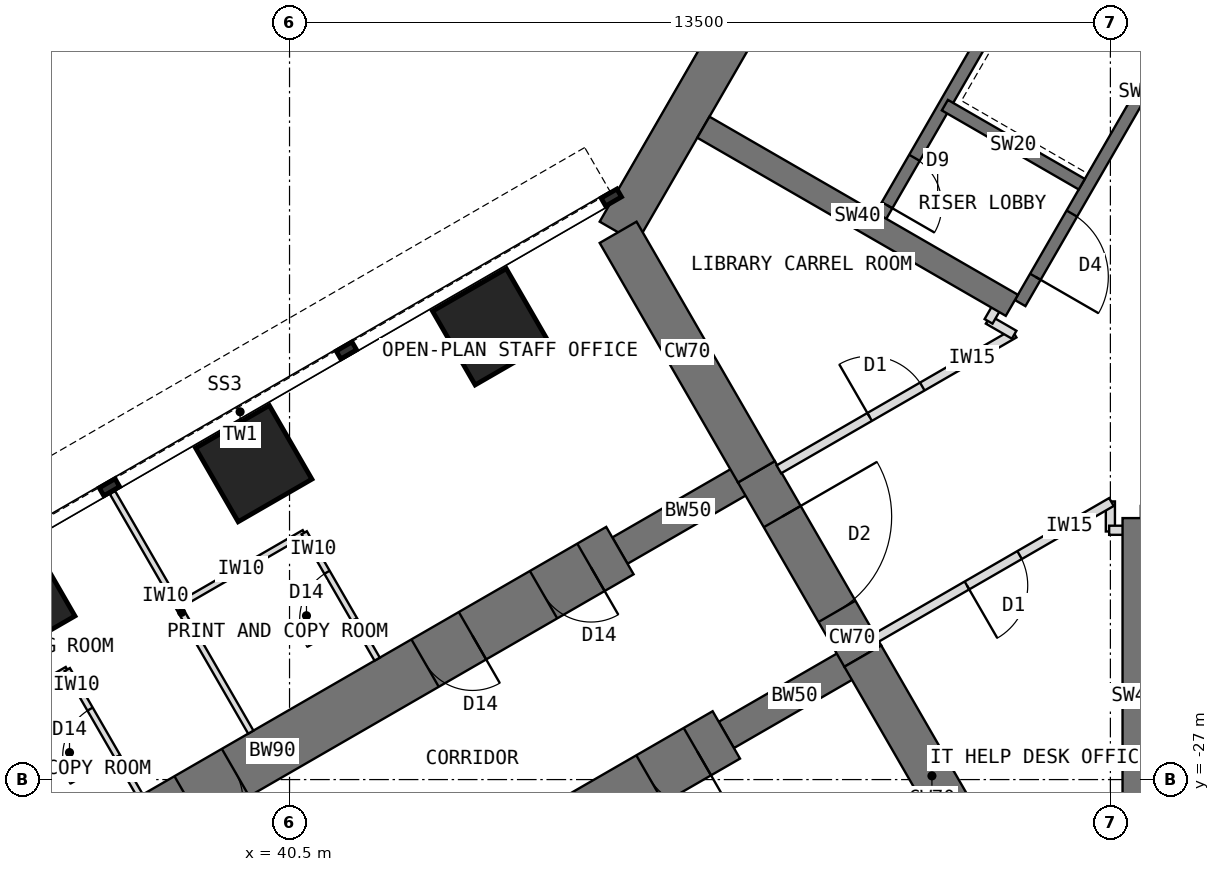
"""IFC4 building model, lengths in metres.
Left out: names, types, materials, properties, quantities, classifications, styles, units other than length and angle.
Written with IfcOpenShell. Run it as: python <this file> out.ifc"""

import sys

from ifc_helpers import new_model, si_unit, direction, frame, frame_2d, origin, origin_2d, place, context, subcontext, project, spatial, rectangle, extrude, element, fill, save


model = new_model("IFC4")
c1 = context("Model", 3, precision=1e-05, world=origin(), true_north=direction((0.0, 1.0)))
c2 = subcontext(c1, "Body", "Model", "MODEL_VIEW")
j1 = project(units=[si_unit("LENGTHUNIT", "METRE"), si_unit("PLANEANGLEUNIT", "RADIAN")], contexts=[c1])
p1 = place(None, origin())
s1 = spatial("IfcSite", under=j1, at=p1, CompositionType="ELEMENT")
p2 = place(p1, origin())
s2 = spatial("IfcBuilding", under=s1, at=p2, CompositionType="ELEMENT")
p3 = place(p2, frame((0.0, 0.0, 80.5)))
s3 = spatial("IfcBuildingStorey", under=s2, at=p3, CompositionType="ELEMENT", Elevation=80.5)
p4 = place(p3, frame((52.202, -7.092, 0.0), z_axis=(0.0, 0.0, 1.0), x_axis=(-0.500005998175, -0.866021940709, 0.0)))
e1 = element("IfcWall", 1, at=p4, inside=s3, PredefinedType="SHEAR", context=c2, shape_type="SweptSolid", body=[
    extrude(rectangle(XDim=12.596, YDim=0.7, at=frame_2d((6.298, 0.0))), origin(), (0.0, 0.0, 1.0), 4.0),
])
p5 = place(p3, frame((45.904, -18.0, 0.0), z_axis=(0.0, 0.0, 1.0), x_axis=(0.500024481964, -0.866011268655, 0.0)))
e2 = element("IfcWall", 2, at=p5, inside=s3, PredefinedType="SHEAR", context=c2, shape_type="SweptSolid", body=[
    extrude(rectangle(XDim=4.548, YDim=0.7, at=frame_2d((2.274, 0.0))), origin(), (0.0, 0.0, 1.0), 4.0),
])
p6 = place(p3, frame((48.178, -21.939, 0.0), z_axis=(0.0, 0.0, 1.0), x_axis=(0.500010275428, -0.866019471182, 0.0)))
e3 = element("IfcWall", 3, at=p6, inside=s3, PredefinedType="SHEAR", context=c2, shape_type="SweptSolid", body=[
    extrude(rectangle(XDim=3.5, YDim=0.7, at=frame_2d((1.75, 0.0))), origin(), (0.0, 0.0, 1.0), 4.0),
])
p7 = place(p6, frame((0.85, 0.0, 0.0)))
e4 = element("IfcOpeningElement", 4, at=p7, cuts=e3, PredefinedType="OPENING", context=c2, shape_type="SweptSolid", body=[
    extrude(rectangle(XDim=1.8, YDim=2.1, at=frame_2d((0.9, 1.05))), frame((0.0, 0.36, 0.0), z_axis=(0.0, -1.0, 0.0), x_axis=(1.0, 0.0, 0.0)), (0.0, 0.0, 1.0), 0.72),
])
p8 = place(p3, frame((49.928, -24.97, 0.0), z_axis=(0.0, 0.0, 1.0), x_axis=(0.499984222037, -0.866034513004, 0.0)))
e5 = element("IfcWall", 5, at=p8, inside=s3, PredefinedType="SHEAR", context=c2, shape_type="SweptSolid", body=[
    extrude(rectangle(XDim=4.548, YDim=0.7, at=frame_2d((2.274, 0.0))), origin(), (0.0, 0.0, 1.0), 4.0),
])
p9 = place(p3, frame((49.928, -24.97, 0.0), z_axis=(0.0, 0.0, 1.0), x_axis=(-0.866031863473, -0.499988811324, 0.0)))
e6 = element("IfcWall", 6, at=p9, inside=s3, PredefinedType="SHEAR", context=c2, shape_type="SweptSolid", body=[
    extrude(rectangle(XDim=2.592, YDim=0.5, at=frame_2d((1.296, 0.0))), origin(), (0.0, 0.0, 1.0), 4.0),
])
p10 = place(p3, frame((47.684, -26.266, 0.0), z_axis=(0.0, 0.0, 1.0), x_axis=(-0.866027579429, -0.499996231654, 0.0)))
e7 = element("IfcWall", 7, at=p10, inside=s3, PredefinedType="SHEAR", context=c2, shape_type="SweptSolid", body=[
    extrude(rectangle(XDim=13.2, YDim=0.9, at=frame_2d((6.6, 0.0))), origin(), (0.0, 0.0, 1.0), 4.0),
])
p11 = place(p10, frame((0.55, 0.0, 0.0)))
e8 = element("IfcOpeningElement", 8, at=p11, cuts=e7, PredefinedType="OPENING", context=c2, shape_type="SweptSolid", body=[
    extrude(rectangle(XDim=0.9, YDim=2.1, at=frame_2d((0.45, 1.05))), frame((0.0, 0.46, 0.0), z_axis=(0.0, -1.0, 0.0), x_axis=(1.0, 0.0, 0.0)), (0.0, 0.0, 1.0), 0.92),
])
p12 = place(p10, frame((2.8, 0.0, 0.0)))
e9 = element("IfcOpeningElement", 9, at=p12, cuts=e7, PredefinedType="OPENING", context=c2, shape_type="SweptSolid", body=[
    extrude(rectangle(XDim=0.9, YDim=2.1, at=frame_2d((0.45, 1.05))), frame((0.0, 0.46, 0.0), z_axis=(0.0, -1.0, 0.0), x_axis=(1.0, 0.0, 0.0)), (0.0, 0.0, 1.0), 0.92),
])
p13 = place(p10, frame((7.3, 0.0, 0.0)))
e10 = element("IfcOpeningElement", 10, at=p13, cuts=e7, PredefinedType="OPENING", context=c2, shape_type="SweptSolid", body=[
    extrude(rectangle(XDim=0.9, YDim=2.1, at=frame_2d((0.45, 1.05))), frame((0.0, 0.46, 0.0), z_axis=(0.0, -1.0, 0.0), x_axis=(1.0, 0.0, 0.0)), (0.0, 0.0, 1.0), 0.92),
])
p14 = place(p3, frame((48.178, -21.939, 0.0), z_axis=(0.0, 0.0, 1.0), x_axis=(-0.866072649678, -0.499918158782, 0.0)))
e11 = element("IfcWall", 11, at=p14, inside=s3, PredefinedType="SHEAR", context=c2, shape_type="SweptSolid", body=[
    extrude(rectangle(XDim=2.592, YDim=0.5, at=frame_2d((1.296, 0.0))), origin(), (0.0, 0.0, 1.0), 4.0),
])
p15 = place(p3, frame((45.934, -23.234, 0.0), z_axis=(0.0, 0.0, 1.0), x_axis=(-0.866019570528, -0.500010103361, 0.0)))
e12 = element("IfcWall", 12, at=p15, inside=s3, PredefinedType="SHEAR", context=c2, shape_type="SweptSolid", body=[
    extrude(rectangle(XDim=13.2, YDim=0.9, at=frame_2d((6.6, 0.0))), origin(), (0.0, 0.0, 1.0), 4.0),
])
p16 = place(p15, frame((0.55, 0.0, 0.0)))
e13 = element("IfcOpeningElement", 13, at=p16, cuts=e12, PredefinedType="OPENING", context=c2, shape_type="SweptSolid", body=[
    extrude(rectangle(XDim=0.9, YDim=2.1, at=frame_2d((0.45, 1.05))), frame((0.0, 0.46, 0.0), z_axis=(0.0, -1.0, 0.0), x_axis=(1.0, 0.0, 0.0)), (0.0, 0.0, 1.0), 0.92),
])
p17 = place(p15, frame((2.8, 0.0, 0.0)))
e14 = element("IfcOpeningElement", 14, at=p17, cuts=e12, PredefinedType="OPENING", context=c2, shape_type="SweptSolid", body=[
    extrude(rectangle(XDim=0.9, YDim=2.1, at=frame_2d((0.45, 1.05))), frame((0.0, 0.46, 0.0), z_axis=(0.0, -1.0, 0.0), x_axis=(1.0, 0.0, 0.0)), (0.0, 0.0, 1.0), 0.92),
])
p18 = place(p15, frame((7.3, 0.0, 0.0)))
e15 = element("IfcOpeningElement", 15, at=p18, cuts=e12, PredefinedType="OPENING", context=c2, shape_type="SweptSolid", body=[
    extrude(rectangle(XDim=0.9, YDim=2.1, at=frame_2d((0.45, 1.05))), frame((0.0, 0.46, 0.0), z_axis=(0.0, -1.0, 0.0), x_axis=(1.0, 0.0, 0.0)), (0.0, 0.0, 1.0), 0.92),
])
for number, where, z_axis, x_axis in (
    (16, (43.809, -19.554, 0.0), (0.0, 0.0, 1.0), (0.866, 0.5, 0.0)),
    (17, (39.912, -21.804, 0.0), (0.0, 0.0, 1.0), (0.866, 0.5, 0.0)),
    (18, (36.014, -24.054, 0.0), (0.0, 0.0, 1.0), (0.866, 0.5, 0.0)),
):
    element("IfcColumn", number, at=place(p3, frame(where, z_axis=z_axis, x_axis=x_axis)), inside=s3, PredefinedType="COLUMN", context=c2, shape_type="SweptSolid", body=[
        extrude(rectangle(XDim=1.4, YDim=1.4, at=origin_2d()), origin(), (0.0, 0.0, 1.0), 4.0),
    ])
p19 = place(p3, frame((56.516, -12.236, 0.0), z_axis=(0.0, 0.0, 1.0), x_axis=(-0.49999894854, -0.866026010844, 0.0)))
e19 = element("IfcWall", 19, at=p19, inside=s3, PredefinedType="SHEAR", context=c2, shape_type="SweptSolid", body=[
    extrude(rectangle(XDim=8.0, YDim=0.2, at=frame_2d((4.0, 0.0))), origin(), (0.0, 0.0, 1.0), 4.0),
])
p20 = place(p19, frame((6.3, 0.0, 0.0)))
e20 = element("IfcOpeningElement", 20, at=p20, cuts=e19, PredefinedType="OPENING", context=c2, shape_type="SweptSolid", body=[
    extrude(rectangle(XDim=1.2, YDim=2.1, at=frame_2d((0.6, 1.05))), frame((0.0, 0.11, 0.0), z_axis=(0.0, -1.0, 0.0), x_axis=(1.0, 0.0, 0.0)), (0.0, 0.0, 1.0), 0.22),
])
p21 = place(p3, frame((53.53, -17.209, 0.0), z_axis=(0.0, 0.0, 1.0), x_axis=(-0.866062058628, 0.499936506574, 0.0)))
e21 = element("IfcWall", 21, at=p21, inside=s3, PredefinedType="SHEAR", context=c2, shape_type="SweptSolid", body=[
    extrude(rectangle(XDim=2.6, YDim=0.2, at=frame_2d((1.3, 0.0))), origin(), (0.0, 0.0, 1.0), 4.0),
])
p22 = place(p3, frame((54.178, -10.886, 0.0), z_axis=(0.0, 0.0, 1.0), x_axis=(-0.49999894854, -0.866026010844, 0.0)))
e22 = element("IfcWall", 22, at=p22, inside=s3, PredefinedType="SHEAR", context=c2, shape_type="SweptSolid", body=[
    extrude(rectangle(XDim=8.0, YDim=0.2, at=frame_2d((4.0, 0.0))), origin(), (0.0, 0.0, 1.0), 4.0),
])
p23 = place(p22, frame((6.8, 0.0, 0.0)))
e23 = element("IfcOpeningElement", 23, at=p23, cuts=e22, PredefinedType="OPENING", context=c2, shape_type="SweptSolid", body=[
    extrude(rectangle(XDim=0.9, YDim=2.1, at=frame_2d((0.45, 1.05))), frame((0.0, 0.11, 0.0), z_axis=(0.0, -1.0, 0.0), x_axis=(1.0, 0.0, 0.0)), (0.0, 0.0, 1.0), 0.22),
])
for number, where, z_axis, x_axis in (
    (24, (52.38, -19.201, 0.0), (0.0, 0.0, 1.0), (-0.866, 0.5, 0.0)),
    (25, (54.4, -22.7, 0.0), (0.0, 0.0, 1.0), (0.0, -1.0, 0.0)),
):
    element("IfcWall", number, at=place(p3, frame(where, z_axis=z_axis, x_axis=x_axis)), inside=s3, PredefinedType="SHEAR", context=c2, shape_type="SweptSolid", body=[
        extrude(rectangle(XDim=5.858, YDim=0.4, at=frame_2d((2.929, 0.0))), origin(), (0.0, 0.0, 1.0), 4.0),
    ])
p24 = place(p3, frame((39.863, -26.22, 0.0), z_axis=(0.0, 0.0, 1.0), x_axis=(-0.500022803284, 0.866012237902, 0.0)))
e26 = element("IfcWall", 26, at=p24, inside=s3, PredefinedType="PARTITIONING", context=c2, shape_type="SweptSolid", body=[
    extrude(rectangle(XDim=4.55, YDim=0.1, at=frame_2d((2.275, 0.0))), origin(), (0.0, 0.0, 1.0), 3.8),
])
p25 = place(p3, frame((40.741, -22.941, 0.0), z_axis=(0.0, 0.0, 1.0), x_axis=(-0.865980596518, -0.500077600433, 0.0)))
e27 = element("IfcWall", 27, at=p25, inside=s3, PredefinedType="PARTITIONING", context=c2, shape_type="SweptSolid", body=[
    extrude(rectangle(XDim=2.4, YDim=0.1, at=frame_2d((1.2, 0.0))), origin(), (0.0, 0.0, 1.0), 3.8),
])
p26 = place(p3, frame((41.941, -25.02, 0.0), z_axis=(0.0, 0.0, 1.0), x_axis=(-0.499957262057, 0.866050077142, 0.0)))
e28 = element("IfcWall", 28, at=p26, inside=s3, PredefinedType="PARTITIONING", context=c2, shape_type="SweptSolid", body=[
    extrude(rectangle(XDim=2.4, YDim=0.1, at=frame_2d((1.2, 0.0))), origin(), (0.0, 0.0, 1.0), 3.8),
])
p27 = place(p26, frame((0.75, 0.0, 0.0)))
e29 = element("IfcOpeningElement", 29, at=p27, cuts=e28, PredefinedType="OPENING", context=c2, shape_type="SweptSolid", body=[
    extrude(rectangle(XDim=0.9, YDim=2.1, at=frame_2d((0.45, 1.05))), frame((0.0, 0.06, 0.0), z_axis=(0.0, -1.0, 0.0), x_axis=(1.0, 0.0, 0.0)), (0.0, 0.0, 1.0), 0.12),
])
p28 = place(p3, frame((36.844, -25.191, 0.0), z_axis=(0.0, 0.0, 1.0), x_axis=(-0.865980596518, -0.500077600433, 0.0)))
e30 = element("IfcWall", 30, at=p28, inside=s3, PredefinedType="PARTITIONING", context=c2, shape_type="SweptSolid", body=[
    extrude(rectangle(XDim=2.4, YDim=0.1, at=frame_2d((1.2, 0.0))), origin(), (0.0, 0.0, 1.0), 3.8),
])
p29 = place(p3, frame((38.044, -27.27, 0.0), z_axis=(0.0, 0.0, 1.0), x_axis=(-0.500033551112, 0.866006032174, 0.0)))
e31 = element("IfcWall", 31, at=p29, inside=s3, PredefinedType="PARTITIONING", context=c2, shape_type="SweptSolid", body=[
    extrude(rectangle(XDim=2.4, YDim=0.1, at=frame_2d((1.2, 0.0))), origin(), (0.0, 0.0, 1.0), 3.8),
])
p30 = place(p29, frame((0.75, 0.0, 0.0)))
e32 = element("IfcOpeningElement", 32, at=p30, cuts=e31, PredefinedType="OPENING", context=c2, shape_type="SweptSolid", body=[
    extrude(rectangle(XDim=0.9, YDim=2.1, at=frame_2d((0.45, 1.05))), frame((0.0, 0.06, 0.0), z_axis=(0.0, -1.0, 0.0), x_axis=(1.0, 0.0, 0.0)), (0.0, 0.0, 1.0), 0.12),
])
p31 = place(p3, frame((54.0, -22.92, 0.0), z_axis=(0.0, 0.0, 1.0), x_axis=(0.0, 1.0, 0.0)))
e33 = element("IfcWall", 33, at=p31, inside=s3, PredefinedType="PARTITIONING", context=c2, shape_type="SweptSolid", body=[
    extrude(rectangle(XDim=0.494, YDim=0.15, at=frame_2d((0.247, 0.0))), origin(), (0.0, 0.0, 1.0), 3.8),
])
p32 = place(p3, frame((54.017, -22.436, 0.0), z_axis=(0.0, 0.0, 1.0), x_axis=(-0.866015446554, -0.500017246033, 0.0)))
e34 = element("IfcWall", 34, at=p32, inside=s3, PredefinedType="PARTITIONING", context=c2, shape_type="SweptSolid", body=[
    extrude(rectangle(XDim=4.469, YDim=0.15, at=frame_2d((2.234, 0.0))), origin(), (0.0, 0.0, 1.0), 3.8),
])
p33 = place(p32, frame((1.744, 0.0, 0.0)))
e35 = element("IfcOpeningElement", 35, at=p33, cuts=e34, PredefinedType="OPENING", context=c2, shape_type="SweptSolid", body=[
    extrude(rectangle(XDim=1.0, YDim=2.1, at=frame_2d((0.5, 1.05))), frame((0.0, 0.085, 0.0), z_axis=(0.0, -1.0, 0.0), x_axis=(1.0, 0.0, 0.0)), (0.0, 0.0, 1.0), 0.17),
])
p34 = place(p3, frame((48.548, -21.898, 0.0), z_axis=(0.0, 0.0, 1.0), x_axis=(0.866025445582, 0.499999927604, 0.0)))
e36 = element("IfcWall", 36, at=p34, inside=s3, PredefinedType="PARTITIONING", context=c2, shape_type="SweptSolid", body=[
    extrude(rectangle(XDim=4.468, YDim=0.15, at=frame_2d((2.234, 0.0))), origin(), (0.0, 0.0, 1.0), 3.8),
])
p35 = place(p34, frame((1.724, 0.0, 0.0)))
e37 = element("IfcOpeningElement", 37, at=p35, cuts=e36, PredefinedType="OPENING", context=c2, shape_type="SweptSolid", body=[
    extrude(rectangle(XDim=1.0, YDim=2.1, at=frame_2d((0.5, 1.05))), frame((0.0, 0.085, 0.0), z_axis=(0.0, -1.0, 0.0), x_axis=(1.0, 0.0, 0.0)), (0.0, 0.0, 1.0), 0.17),
])
p36 = place(p3, frame((52.417, -19.684, 0.0), z_axis=(0.0, 0.0, 1.0), x_axis=(-0.865831790172, 0.50033519877, 0.0)))
e38 = element("IfcWall", 38, at=p36, inside=s3, PredefinedType="PARTITIONING", context=c2, shape_type="SweptSolid", body=[
    extrude(rectangle(XDim=0.494, YDim=0.15, at=frame_2d((0.247, 0.0))), origin(), (0.0, 0.0, 1.0), 3.8),
])
for number, where, z_axis, x_axis in (
    (39, (51.997, -19.464, 0.0), (0.0, 0.0, 1.0), (0.5, 0.866, 0.0)),
    (40, (54.41, -22.9, 0.0), (0.0, 0.0, 1.0), (-1.0, 0.0, 0.0)),
):
    element("IfcWall", number, at=place(p3, frame(where, z_axis=z_axis, x_axis=x_axis)), inside=s3, PredefinedType="PARTITIONING", context=c2, shape_type="SweptSolid", body=[
        extrude(rectangle(XDim=0.43, YDim=0.15, at=frame_2d((0.215, 0.0))), origin(), (0.0, 0.0, 1.0), 3.8),
    ])
p37 = place(p20, origin())
e41 = element("IfcDoor", 41, at=p37, inside=s3, OperationType="SINGLE_SWING_RIGHT", PredefinedType="DOOR", context=c2, shape_type="SweptSolid", body=[
    extrude(rectangle(XDim=1.2, YDim=2.1, at=frame_2d((0.6, 1.05))), frame((0.0, 0.025, 0.0), z_axis=(0.0, -1.0, 0.0), x_axis=(1.0, 0.0, 0.0)), (0.0, 0.0, 1.0), 0.05),
])
fill(e20, e41)
p38 = place(p23, origin())
e42 = element("IfcDoor", 42, at=p38, inside=s3, OperationType="SINGLE_SWING_RIGHT", PredefinedType="DOOR", context=c2, shape_type="SweptSolid", body=[
    extrude(rectangle(XDim=0.9, YDim=2.1, at=frame_2d((0.45, 1.05))), frame((0.0, 0.025, 0.0), z_axis=(0.0, -1.0, 0.0), x_axis=(1.0, 0.0, 0.0)), (0.0, 0.0, 1.0), 0.05),
])
fill(e23, e42)
p39 = place(p7, origin())
e43 = element("IfcDoor", 43, at=p39, inside=s3, OperationType="DOUBLE_DOOR_DOUBLE_SWING", PredefinedType="DOOR", context=c2, shape_type="SweptSolid", body=[
    extrude(rectangle(XDim=1.72, YDim=2.06, at=frame_2d((0.9, 1.03))), frame((0.0, 0.025, 0.0), z_axis=(0.0, -1.0, 0.0), x_axis=(1.0, 0.0, 0.0)), (0.0, 0.0, 1.0), 0.05),
    extrude(rectangle(XDim=0.04, YDim=2.1, at=frame_2d((0.02, 1.05))), frame((0.0, 0.35, 0.0), z_axis=(0.0, -1.0, 0.0), x_axis=(1.0, 0.0, 0.0)), (0.0, 0.0, 1.0), 0.699),
    extrude(rectangle(XDim=0.04, YDim=2.1, at=frame_2d((1.78, 1.05))), frame((0.0, 0.35, 0.0), z_axis=(0.0, -1.0, 0.0), x_axis=(1.0, 0.0, 0.0)), (0.0, 0.0, 1.0), 0.699),
    extrude(rectangle(XDim=1.72, YDim=0.04, at=frame_2d((0.9, 2.08))), frame((0.0, 0.35, 0.0), z_axis=(0.0, -1.0, 0.0), x_axis=(1.0, 0.0, 0.0)), (0.0, 0.0, 1.0), 0.699),
])
fill(e4, e43)
p40 = place(p27, origin())
e44 = element("IfcDoor", 44, at=p40, inside=s3, OperationType="SINGLE_SWING_LEFT", PredefinedType="DOOR", context=c2, shape_type="SweptSolid", body=[
    extrude(rectangle(XDim=0.9, YDim=2.1, at=frame_2d((0.45, 1.05))), frame((0.0, 0.025, 0.0), z_axis=(0.0, -1.0, 0.0), x_axis=(1.0, 0.0, 0.0)), (0.0, 0.0, 1.0), 0.05),
])
fill(e29, e44)
p41 = place(p30, origin())
e45 = element("IfcDoor", 45, at=p41, inside=s3, OperationType="SINGLE_SWING_LEFT", PredefinedType="DOOR", context=c2, shape_type="SweptSolid", body=[
    extrude(rectangle(XDim=0.9, YDim=2.1, at=frame_2d((0.45, 1.05))), frame((0.0, 0.025, 0.0), z_axis=(0.0, -1.0, 0.0), x_axis=(1.0, 0.0, 0.0)), (0.0, 0.0, 1.0), 0.05),
])
fill(e32, e45)
p42 = place(p35, origin())
e46 = element("IfcDoor", 46, at=p42, inside=s3, OperationType="SINGLE_SWING_LEFT", PredefinedType="DOOR", context=c2, shape_type="SweptSolid", body=[
    extrude(rectangle(XDim=1.0, YDim=2.1, at=frame_2d((0.5, 1.05))), frame((0.0, 0.025, 0.0), z_axis=(0.0, -1.0, 0.0), x_axis=(1.0, 0.0, 0.0)), (0.0, 0.0, 1.0), 0.05),
])
fill(e37, e46)
p43 = place(p33, origin())
e47 = element("IfcDoor", 47, at=p43, inside=s3, OperationType="SINGLE_SWING_RIGHT", PredefinedType="DOOR", context=c2, shape_type="SweptSolid", body=[
    extrude(rectangle(XDim=1.0, YDim=2.1, at=frame_2d((0.5, 1.05))), frame((0.0, 0.025, 0.0), z_axis=(0.0, -1.0, 0.0), x_axis=(1.0, 0.0, 0.0)), (0.0, 0.0, 1.0), 0.05),
])
fill(e35, e47)
p44 = place(p11, origin())
e48 = element("IfcDoor", 48, at=p44, inside=s3, OperationType="SINGLE_SWING_LEFT", PredefinedType="DOOR", context=c2, shape_type="SweptSolid", body=[
    extrude(rectangle(XDim=0.82, YDim=2.06, at=frame_2d((0.45, 1.03))), frame((0.0, 0.025, 0.0), z_axis=(0.0, -1.0, 0.0), x_axis=(1.0, 0.0, 0.0)), (0.0, 0.0, 1.0), 0.05),
    extrude(rectangle(XDim=0.04, YDim=2.1, at=frame_2d((0.02, 1.05))), frame((0.0, 0.45, 0.0), z_axis=(0.0, -1.0, 0.0), x_axis=(1.0, 0.0, 0.0)), (0.0, 0.0, 1.0), 0.899),
    extrude(rectangle(XDim=0.04, YDim=2.1, at=frame_2d((0.88, 1.05))), frame((0.0, 0.45, 0.0), z_axis=(0.0, -1.0, 0.0), x_axis=(1.0, 0.0, 0.0)), (0.0, 0.0, 1.0), 0.899),
    extrude(rectangle(XDim=0.82, YDim=0.04, at=frame_2d((0.45, 2.08))), frame((0.0, 0.45, 0.0), z_axis=(0.0, -1.0, 0.0), x_axis=(1.0, 0.0, 0.0)), (0.0, 0.0, 1.0), 0.899),
])
fill(e8, e48)
p45 = place(p16, origin())
e49 = element("IfcDoor", 49, at=p45, inside=s3, OperationType="SINGLE_SWING_LEFT", PredefinedType="DOOR", context=c2, shape_type="SweptSolid", body=[
    extrude(rectangle(XDim=0.82, YDim=2.06, at=frame_2d((0.45, 1.03))), frame((0.0, 0.025, 0.0), z_axis=(0.0, -1.0, 0.0), x_axis=(1.0, 0.0, 0.0)), (0.0, 0.0, 1.0), 0.05),
    extrude(rectangle(XDim=0.04, YDim=2.1, at=frame_2d((0.02, 1.05))), frame((0.0, 0.45, 0.0), z_axis=(0.0, -1.0, 0.0), x_axis=(1.0, 0.0, 0.0)), (0.0, 0.0, 1.0), 0.899),
    extrude(rectangle(XDim=0.04, YDim=2.1, at=frame_2d((0.88, 1.05))), frame((0.0, 0.45, 0.0), z_axis=(0.0, -1.0, 0.0), x_axis=(1.0, 0.0, 0.0)), (0.0, 0.0, 1.0), 0.899),
    extrude(rectangle(XDim=0.82, YDim=0.04, at=frame_2d((0.45, 2.08))), frame((0.0, 0.45, 0.0), z_axis=(0.0, -1.0, 0.0), x_axis=(1.0, 0.0, 0.0)), (0.0, 0.0, 1.0), 0.899),
])
fill(e13, e49)
p46 = place(p17, origin())
e50 = element("IfcDoor", 50, at=p46, inside=s3, OperationType="SINGLE_SWING_LEFT", PredefinedType="DOOR", context=c2, shape_type="SweptSolid", body=[
    extrude(rectangle(XDim=0.82, YDim=2.06, at=frame_2d((0.45, 1.03))), frame((0.0, 0.025, 0.0), z_axis=(0.0, -1.0, 0.0), x_axis=(1.0, 0.0, 0.0)), (0.0, 0.0, 1.0), 0.05),
    extrude(rectangle(XDim=0.04, YDim=2.1, at=frame_2d((0.02, 1.05))), frame((0.0, 0.45, 0.0), z_axis=(0.0, -1.0, 0.0), x_axis=(1.0, 0.0, 0.0)), (0.0, 0.0, 1.0), 0.899),
    extrude(rectangle(XDim=0.04, YDim=2.1, at=frame_2d((0.88, 1.05))), frame((0.0, 0.45, 0.0), z_axis=(0.0, -1.0, 0.0), x_axis=(1.0, 0.0, 0.0)), (0.0, 0.0, 1.0), 0.899),
    extrude(rectangle(XDim=0.82, YDim=0.04, at=frame_2d((0.45, 2.08))), frame((0.0, 0.45, 0.0), z_axis=(0.0, -1.0, 0.0), x_axis=(1.0, 0.0, 0.0)), (0.0, 0.0, 1.0), 0.899),
])
fill(e14, e50)
p47 = place(p18, origin())
e51 = element("IfcDoor", 51, at=p47, inside=s3, OperationType="SINGLE_SWING_RIGHT", PredefinedType="DOOR", context=c2, shape_type="SweptSolid", body=[
    extrude(rectangle(XDim=0.82, YDim=2.06, at=frame_2d((0.45, 1.03))), frame((0.0, 0.025, 0.0), z_axis=(0.0, -1.0, 0.0), x_axis=(1.0, 0.0, 0.0)), (0.0, 0.0, 1.0), 0.05),
    extrude(rectangle(XDim=0.04, YDim=2.1, at=frame_2d((0.02, 1.05))), frame((0.0, 0.45, 0.0), z_axis=(0.0, -1.0, 0.0), x_axis=(1.0, 0.0, 0.0)), (0.0, 0.0, 1.0), 0.899),
    extrude(rectangle(XDim=0.04, YDim=2.1, at=frame_2d((0.88, 1.05))), frame((0.0, 0.45, 0.0), z_axis=(0.0, -1.0, 0.0), x_axis=(1.0, 0.0, 0.0)), (0.0, 0.0, 1.0), 0.899),
    extrude(rectangle(XDim=0.82, YDim=0.04, at=frame_2d((0.45, 2.08))), frame((0.0, 0.45, 0.0), z_axis=(0.0, -1.0, 0.0), x_axis=(1.0, 0.0, 0.0)), (0.0, 0.0, 1.0), 0.899),
])
fill(e15, e51)
save(model, sys.argv[1])
